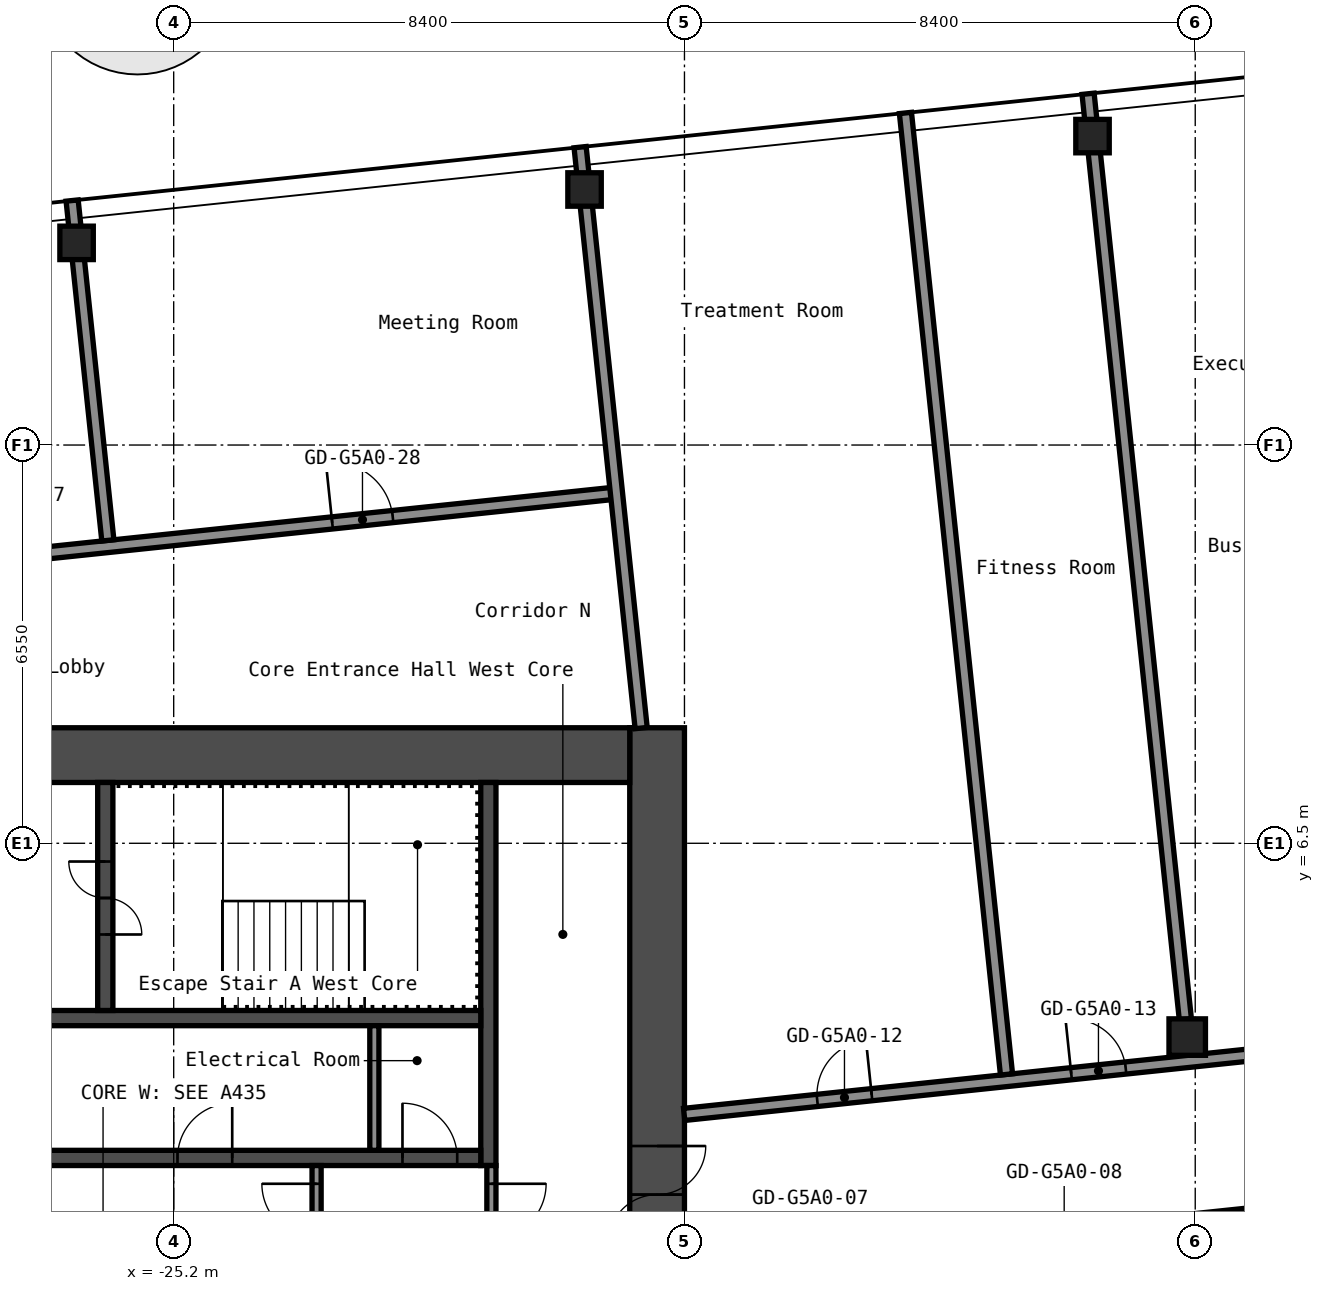
"""IFC4 building model, lengths in metres.
Left out: names, types, materials, properties, quantities, classifications, styles, units other than length and angle.
Written with IfcOpenShell. Run it as: python <this file> out.ifc"""

import sys

from ifc_helpers import new_model, si_unit, direction, frame, frame_2d, origin, origin_2d, place, context, subcontext, project, spatial, rectangle, hollow_rectangle, extrude, element, fill, save


model = new_model("IFC4")
c1 = context("Model", 3, precision=1e-05, world=origin(), true_north=direction((0.0, 1.0)))
c2 = subcontext(c1, "Body", "Model", "MODEL_VIEW")
j1 = project(units=[si_unit("LENGTHUNIT", "METRE"), si_unit("PLANEANGLEUNIT", "RADIAN")], contexts=[c1])
p1 = place(None, origin())
s1 = spatial("IfcSite", under=j1, at=p1, CompositionType="ELEMENT")
p2 = place(p1, origin())
s2 = spatial("IfcBuilding", under=s1, at=p2, CompositionType="ELEMENT")
p3 = place(p2, frame((0.0, 0.0, 239.0)))
s3 = spatial("IfcBuildingStorey", under=s2, at=p3, CompositionType="ELEMENT", Elevation=239.0)
for number, where, z_axis, x_axis in (
    (1, (-26.797, 16.375, 0.0), (0.0, 0.0, 1.0), (1.0, 0.0, 0.0)),
    (2, (-18.443, 17.253, 0.0), (0.0, 0.0, 1.0), (1.0, 0.0, 0.0)),
):
    element("IfcColumn", number, at=place(p3, frame(where, z_axis=z_axis, x_axis=x_axis)), inside=s3, PredefinedType="COLUMN", context=c2, shape_type="SweptSolid", body=[
        extrude(hollow_rectangle(XDim=0.55, YDim=0.55, WallThickness=0.022, InnerFilletRadius=0.033, OuterFilletRadius=0.055, at=origin_2d()), origin(), (0.0, 0.0, 1.0), 2.75),
    ])
p4 = place(p3, frame((-8.532, 3.312, 0.0), z_axis=(0.0, 0.0, 1.0), x_axis=(1.0, 0.0, 0.0)))
e3 = element("IfcColumn", 3, at=p4, inside=s3, PredefinedType="COLUMN", context=c2, shape_type="SweptSolid", body=[
    extrude(hollow_rectangle(XDim=0.6, YDim=0.6, WallThickness=0.025, InnerFilletRadius=0.038, OuterFilletRadius=0.062, at=origin_2d()), origin(), (0.0, 0.0, 1.0), 2.75),
])
p5 = place(p3, frame((-10.089, 18.131, 0.0), z_axis=(0.0, 0.0, 1.0), x_axis=(1.0, 0.0, 0.0)))
e4 = element("IfcColumn", 4, at=p5, inside=s3, PredefinedType="COLUMN", context=c2, shape_type="SweptSolid", body=[
    extrude(hollow_rectangle(XDim=0.55, YDim=0.55, WallThickness=0.022, InnerFilletRadius=0.033, OuterFilletRadius=0.055, at=origin_2d()), origin(), (0.0, 0.0, 1.0), 2.75),
])
p6 = place(p3, frame((-17.25, -8.4, 0.0), z_axis=(0.0, 0.0, 1.0), x_axis=(0.0, 1.0, 0.0)))
e5 = element("IfcWall", 5, at=p6, inside=s3, PredefinedType="SHEAR", context=c2, shape_type="SweptSolid", body=[
    extrude(rectangle(XDim=16.8, YDim=0.9, at=frame_2d((8.4, 0.0))), origin(), (0.0, 0.0, 1.0), 2.75),
])
p7 = place(p6, frame((8.321, 0.0, 0.0)))
e6 = element("IfcOpeningElement", 6, at=p7, cuts=e5, PredefinedType="OPENING", context=c2, shape_type="SweptSolid", body=[
    extrude(rectangle(XDim=1.6, YDim=2.1, at=frame_2d((0.8, 1.05))), frame((0.0, 0.46, 0.0), z_axis=(0.0, -1.0, 0.0), x_axis=(1.0, 0.0, 0.0)), (0.0, 0.0, 1.0), 0.92),
])
p8 = place(p3, frame((-32.7, 7.95, 0.0), z_axis=(0.0, 0.0, 1.0), x_axis=(1.0, 0.0, 0.0)))
e7 = element("IfcWall", 7, at=p8, inside=s3, PredefinedType="SHEAR", context=c2, shape_type="SweptSolid", body=[
    extrude(rectangle(XDim=15.0, YDim=0.9, at=frame_2d((7.5, 0.0))), origin(), (0.0, 0.0, 1.0), 2.75),
])
p9 = place(p8, frame((3.4, 0.0, 0.0)))
e8 = element("IfcOpeningElement", 8, at=p9, cuts=e7, PredefinedType="OPENING", context=c2, shape_type="SweptSolid", body=[
    extrude(rectangle(XDim=1.2, YDim=2.1, at=frame_2d((0.6, 1.05))), frame((0.0, 0.46, 0.0), z_axis=(0.0, -1.0, 0.0), x_axis=(1.0, 0.0, 0.0)), (0.0, 0.0, 1.0), 0.92),
])
p10 = place(p8, frame((0.75, 0.0, 0.0)))
e9 = element("IfcOpeningElement", 9, at=p10, cuts=e7, PredefinedType="OPENING", context=c2, shape_type="SweptSolid", body=[
    extrude(rectangle(XDim=0.9, YDim=2.1, at=frame_2d((0.45, 1.05))), frame((0.0, 0.46, 0.0), z_axis=(0.0, -1.0, 0.0), x_axis=(1.0, 0.0, 0.0)), (0.0, 0.0, 1.0), 0.92),
])
p11 = place(p3, frame((-20.025, 1.2, 0.0), z_axis=(0.0, 0.0, 1.0), x_axis=(0.0, 1.0, 0.0)))
e10 = element("IfcWall", 10, at=p11, inside=s3, PredefinedType="SHEAR", context=c2, shape_type="SweptSolid", body=[
    extrude(rectangle(XDim=6.3, YDim=0.25, at=frame_2d((3.15, 0.0))), origin(), (0.0, 0.0, 1.0), 2.75),
])
p12 = place(p3, frame((-27.65, 1.325, 0.0), z_axis=(0.0, 0.0, 1.0), x_axis=(1.0, 0.0, 0.0)))
e11 = element("IfcWall", 11, at=p12, inside=s3, PredefinedType="SHEAR", context=c2, shape_type="SweptSolid", body=[
    extrude(rectangle(XDim=7.5, YDim=0.25, at=frame_2d((3.75, 0.0))), origin(), (0.0, 0.0, 1.0), 2.75),
])
p13 = place(p12, frame((6.212, 0.0, 0.0)))
e12 = element("IfcOpeningElement", 12, at=p13, cuts=e11, PredefinedType="OPENING", context=c2, shape_type="SweptSolid", body=[
    extrude(rectangle(XDim=0.9, YDim=2.1, at=frame_2d((0.45, 1.05))), frame((0.0, 0.135, 0.0), z_axis=(0.0, -1.0, 0.0), x_axis=(1.0, 0.0, 0.0)), (0.0, 0.0, 1.0), 0.27),
])
p14 = place(p12, frame((2.512, 0.0, 0.0)))
e13 = element("IfcOpeningElement", 13, at=p14, cuts=e11, PredefinedType="OPENING", context=c2, shape_type="SweptSolid", body=[
    extrude(rectangle(XDim=0.9, YDim=2.1, at=frame_2d((0.45, 1.05))), frame((0.0, 0.135, 0.0), z_axis=(0.0, -1.0, 0.0), x_axis=(1.0, 0.0, 0.0)), (0.0, 0.0, 1.0), 0.27),
])
p15 = place(p3, frame((-27.65, 3.625, 0.0), z_axis=(0.0, 0.0, 1.0), x_axis=(1.0, 0.0, 0.0)))
e14 = element("IfcWall", 14, at=p15, inside=s3, PredefinedType="SHEAR", context=c2, shape_type="SweptSolid", body=[
    extrude(rectangle(XDim=7.5, YDim=0.25, at=frame_2d((3.75, 0.0))), origin(), (0.0, 0.0, 1.0), 2.75),
])
p16 = place(p3, frame((-26.325, 3.75, 0.0), z_axis=(0.0, 0.0, 1.0), x_axis=(0.0, 1.0, 0.0)))
e15 = element("IfcWall", 15, at=p16, inside=s3, PredefinedType="SHEAR", context=c2, shape_type="SweptSolid", body=[
    extrude(rectangle(XDim=3.75, YDim=0.25, at=frame_2d((1.875, 0.0))), origin(), (0.0, 0.0, 1.0), 2.75),
])
p17 = place(p16, frame((1.25, 0.0, 0.0)))
e16 = element("IfcOpeningElement", 16, at=p17, cuts=e15, PredefinedType="OPENING", context=c2, shape_type="SweptSolid", body=[
    extrude(rectangle(XDim=1.2, YDim=2.1, at=frame_2d((0.6, 1.05))), frame((0.0, 0.135, 0.0), z_axis=(0.0, -1.0, 0.0), x_axis=(1.0, 0.0, 0.0)), (0.0, 0.0, 1.0), 0.27),
])
p18 = place(p3, frame((-19.975, -1.2, 0.0), z_axis=(0.0, 0.0, 1.0), x_axis=(0.0, 1.0, 0.0)))
e17 = element("IfcWall", 17, at=p18, inside=s3, PredefinedType="PARTITIONING", context=c2, shape_type="SweptSolid", body=[
    extrude(rectangle(XDim=2.4, YDim=0.15, at=frame_2d((1.2, 0.0))), origin(), (0.0, 0.0, 1.0), 2.75),
])
p19 = place(p18, frame((0.3, 0.0, 0.0)))
e18 = element("IfcOpeningElement", 18, at=p19, cuts=e17, PredefinedType="OPENING", context=c2, shape_type="SweptSolid", body=[
    extrude(rectangle(XDim=1.8, YDim=2.1, at=frame_2d((0.9, 1.05))), frame((0.0, 0.085, 0.0), z_axis=(0.0, -1.0, 0.0), x_axis=(1.0, 0.0, 0.0)), (0.0, 0.0, 1.0), 0.17),
])
p20 = place(p3, frame((-22.85, -1.2, 0.0), z_axis=(0.0, 0.0, 1.0), x_axis=(0.0, 1.0, 0.0)))
e19 = element("IfcWall", 19, at=p20, inside=s3, PredefinedType="PARTITIONING", context=c2, shape_type="SweptSolid", body=[
    extrude(rectangle(XDim=2.4, YDim=0.15, at=frame_2d((1.2, 0.0))), origin(), (0.0, 0.0, 1.0), 2.75),
])
p21 = place(p20, frame((0.3, 0.0, 0.0)))
e20 = element("IfcOpeningElement", 20, at=p21, cuts=e19, PredefinedType="OPENING", context=c2, shape_type="SweptSolid", body=[
    extrude(rectangle(XDim=1.8, YDim=2.1, at=frame_2d((0.9, 1.05))), frame((0.0, 0.085, 0.0), z_axis=(0.0, -1.0, 0.0), x_axis=(1.0, 0.0, 0.0)), (0.0, 0.0, 1.0), 0.17),
])
p22 = place(p3, frame((-21.9, 1.45, 0.0), z_axis=(0.0, 0.0, 1.0), x_axis=(0.0, 1.0, 0.0)))
e21 = element("IfcWall", 21, at=p22, inside=s3, PredefinedType="PARTITIONING", context=c2, shape_type="SweptSolid", body=[
    extrude(rectangle(XDim=2.05, YDim=0.15, at=frame_2d((1.025, 0.0))), origin(), (0.0, 0.0, 1.0), 2.75),
])
p23 = place(p3, frame((-16.572, -0.549, 0.0), z_axis=(0.0, 0.0, 1.0), x_axis=(0.994521146831, 0.104535584879, 0.0)))
e22 = element("IfcWall", 22, at=p23, inside=s3, PredefinedType="PARTITIONING", context=c2, shape_type="SweptSolid", body=[
    extrude(rectangle(XDim=33.561, YDim=0.2, at=frame_2d((16.78, 0.0))), origin(), (0.0, 0.0, 1.0), 2.75),
])
p24 = place(p23, frame((1.4, 0.0, 0.0)))
e23 = element("IfcOpeningElement", 23, at=p24, cuts=e22, PredefinedType="OPENING", context=c2, shape_type="SweptSolid", body=[
    extrude(rectangle(XDim=0.9, YDim=2.1, at=frame_2d((0.45, 1.05))), frame((0.0, 0.11, 0.0), z_axis=(0.0, -1.0, 0.0), x_axis=(1.0, 0.0, 0.0)), (0.0, 0.0, 1.0), 0.22),
])
p25 = place(p23, frame((5.6, 0.0, 0.0)))
e24 = element("IfcOpeningElement", 24, at=p25, cuts=e22, PredefinedType="OPENING", context=c2, shape_type="SweptSolid", body=[
    extrude(rectangle(XDim=0.9, YDim=2.1, at=frame_2d((0.45, 1.05))), frame((0.0, 0.11, 0.0), z_axis=(0.0, -1.0, 0.0), x_axis=(1.0, 0.0, 0.0)), (0.0, 0.0, 1.0), 0.22),
])
p26 = place(p23, frame((12.1, 0.0, 0.0)))
e25 = element("IfcOpeningElement", 25, at=p26, cuts=e22, PredefinedType="OPENING", context=c2, shape_type="SweptSolid", body=[
    extrude(rectangle(XDim=1.0, YDim=2.1, at=frame_2d((0.5, 1.05))), frame((0.0, 0.11, 0.0), z_axis=(0.0, -1.0, 0.0), x_axis=(1.0, 0.0, 0.0)), (0.0, 0.0, 1.0), 0.22),
])
p27 = place(p23, frame((18.8, 0.0, 0.0)))
e26 = element("IfcOpeningElement", 26, at=p27, cuts=e22, PredefinedType="OPENING", context=c2, shape_type="SweptSolid", body=[
    extrude(rectangle(XDim=1.0, YDim=2.1, at=frame_2d((0.5, 1.05))), frame((0.0, 0.11, 0.0), z_axis=(0.0, -1.0, 0.0), x_axis=(1.0, 0.0, 0.0)), (0.0, 0.0, 1.0), 0.22),
])
p28 = place(p23, frame((29.4, 0.0, 0.0)))
e27 = element("IfcOpeningElement", 27, at=p28, cuts=e22, PredefinedType="OPENING", context=c2, shape_type="SweptSolid", body=[
    extrude(rectangle(XDim=1.6, YDim=2.1, at=frame_2d((0.8, 1.05))), frame((0.0, 0.11, 0.0), z_axis=(0.0, -1.0, 0.0), x_axis=(1.0, 0.0, 0.0)), (0.0, 0.0, 1.0), 0.22),
])
p29 = place(p3, frame((-16.805, 2.041, 0.0), z_axis=(0.0, 0.0, 1.0), x_axis=(0.994521146831, 0.104535584879, 0.0)))
e28 = element("IfcWall", 28, at=p29, inside=s3, PredefinedType="PARTITIONING", context=c2, shape_type="SweptSolid", body=[
    extrude(rectangle(XDim=33.561, YDim=0.2, at=frame_2d((16.78, 0.0))), origin(), (0.0, 0.0, 1.0), 2.75),
])
p30 = place(p29, frame((2.201, 0.0, 0.0)))
e29 = element("IfcOpeningElement", 29, at=p30, cuts=e28, PredefinedType="OPENING", context=c2, shape_type="SweptSolid", body=[
    extrude(rectangle(XDim=0.9, YDim=2.1, at=frame_2d((0.45, 1.05))), frame((0.0, 0.11, 0.0), z_axis=(0.0, -1.0, 0.0), x_axis=(1.0, 0.0, 0.0)), (0.0, 0.0, 1.0), 0.22),
])
p31 = place(p29, frame((6.401, 0.0, 0.0)))
e30 = element("IfcOpeningElement", 30, at=p31, cuts=e28, PredefinedType="OPENING", context=c2, shape_type="SweptSolid", body=[
    extrude(rectangle(XDim=0.9, YDim=2.1, at=frame_2d((0.45, 1.05))), frame((0.0, 0.11, 0.0), z_axis=(0.0, -1.0, 0.0), x_axis=(1.0, 0.0, 0.0)), (0.0, 0.0, 1.0), 0.22),
])
p32 = place(p29, frame((10.516, 0.0, 0.0)))
e31 = element("IfcOpeningElement", 31, at=p32, cuts=e28, PredefinedType="OPENING", context=c2, shape_type="SweptSolid", body=[
    extrude(rectangle(XDim=0.9, YDim=2.1, at=frame_2d((0.45, 1.05))), frame((0.0, 0.11, 0.0), z_axis=(0.0, -1.0, 0.0), x_axis=(1.0, 0.0, 0.0)), (0.0, 0.0, 1.0), 0.22),
])
p33 = place(p29, frame((14.716, 0.0, 0.0)))
e32 = element("IfcOpeningElement", 32, at=p33, cuts=e28, PredefinedType="OPENING", context=c2, shape_type="SweptSolid", body=[
    extrude(rectangle(XDim=0.9, YDim=2.1, at=frame_2d((0.45, 1.05))), frame((0.0, 0.11, 0.0), z_axis=(0.0, -1.0, 0.0), x_axis=(1.0, 0.0, 0.0)), (0.0, 0.0, 1.0), 0.22),
])
p34 = place(p29, frame((18.241, 0.0, 0.0)))
e33 = element("IfcOpeningElement", 33, at=p34, cuts=e28, PredefinedType="OPENING", context=c2, shape_type="SweptSolid", body=[
    extrude(rectangle(XDim=0.9, YDim=2.1, at=frame_2d((0.45, 1.05))), frame((0.0, 0.11, 0.0), z_axis=(0.0, -1.0, 0.0), x_axis=(1.0, 0.0, 0.0)), (0.0, 0.0, 1.0), 0.22),
])
p35 = place(p29, frame((22.441, 0.0, 0.0)))
e34 = element("IfcOpeningElement", 34, at=p35, cuts=e28, PredefinedType="OPENING", context=c2, shape_type="SweptSolid", body=[
    extrude(rectangle(XDim=0.9, YDim=2.1, at=frame_2d((0.45, 1.05))), frame((0.0, 0.11, 0.0), z_axis=(0.0, -1.0, 0.0), x_axis=(1.0, 0.0, 0.0)), (0.0, 0.0, 1.0), 0.22),
])
p36 = place(p29, frame((26.981, 0.0, 0.0)))
e35 = element("IfcOpeningElement", 35, at=p36, cuts=e28, PredefinedType="OPENING", context=c2, shape_type="SweptSolid", body=[
    extrude(rectangle(XDim=0.9, YDim=2.1, at=frame_2d((0.45, 1.05))), frame((0.0, 0.11, 0.0), z_axis=(0.0, -1.0, 0.0), x_axis=(1.0, 0.0, 0.0)), (0.0, 0.0, 1.0), 0.22),
])
p37 = place(p29, frame((31.181, 0.0, 0.0)))
e36 = element("IfcOpeningElement", 36, at=p37, cuts=e28, PredefinedType="OPENING", context=c2, shape_type="SweptSolid", body=[
    extrude(rectangle(XDim=0.9, YDim=2.1, at=frame_2d((0.45, 1.05))), frame((0.0, 0.11, 0.0), z_axis=(0.0, -1.0, 0.0), x_axis=(1.0, 0.0, 0.0)), (0.0, 0.0, 1.0), 0.22),
])
p38 = place(p3, frame((-39.102, 10.034, 0.0), z_axis=(0.0, 0.0, 1.0), x_axis=(0.994522585465, 0.104521897229, 0.0)))
e37 = element("IfcWall", 37, at=p38, inside=s3, PredefinedType="PARTITIONING", context=c2, shape_type="SweptSolid", body=[
    extrude(rectangle(XDim=21.3, YDim=0.2, at=frame_2d((10.65, 0.0))), origin(), (0.0, 0.0, 1.0), 2.75),
])
p39 = place(p38, frame((3.05, 0.0, 0.0)))
e38 = element("IfcOpeningElement", 38, at=p39, cuts=e37, PredefinedType="OPENING", context=c2, shape_type="SweptSolid", body=[
    extrude(rectangle(XDim=1.0, YDim=2.1, at=frame_2d((0.5, 1.05))), frame((0.0, 0.11, 0.0), z_axis=(0.0, -1.0, 0.0), x_axis=(1.0, 0.0, 0.0)), (0.0, 0.0, 1.0), 0.22),
])
p40 = place(p38, frame((6.57, 0.0, 0.0)))
e39 = element("IfcOpeningElement", 39, at=p40, cuts=e37, PredefinedType="OPENING", context=c2, shape_type="SweptSolid", body=[
    extrude(rectangle(XDim=0.9, YDim=2.1, at=frame_2d((0.45, 1.05))), frame((0.0, 0.11, 0.0), z_axis=(0.0, -1.0, 0.0), x_axis=(1.0, 0.0, 0.0)), (0.0, 0.0, 1.0), 0.22),
])
p41 = place(p38, frame((10.77, 0.0, 0.0)))
e40 = element("IfcOpeningElement", 40, at=p41, cuts=e37, PredefinedType="OPENING", context=c2, shape_type="SweptSolid", body=[
    extrude(rectangle(XDim=0.9, YDim=2.1, at=frame_2d((0.45, 1.05))), frame((0.0, 0.11, 0.0), z_axis=(0.0, -1.0, 0.0), x_axis=(1.0, 0.0, 0.0)), (0.0, 0.0, 1.0), 0.22),
])
p42 = place(p38, frame((16.6, 0.0, 0.0)))
e41 = element("IfcOpeningElement", 41, at=p42, cuts=e37, PredefinedType="OPENING", context=c2, shape_type="SweptSolid", body=[
    extrude(rectangle(XDim=1.0, YDim=2.1, at=frame_2d((0.5, 1.05))), frame((0.0, 0.11, 0.0), z_axis=(0.0, -1.0, 0.0), x_axis=(1.0, 0.0, 0.0)), (0.0, 0.0, 1.0), 0.22),
])
p43 = place(p3, frame((-26.283, 11.482, 0.0), z_axis=(0.0, 0.0, 1.0), x_axis=(-0.104560413987, 0.994518536693, 0.0)))
e42 = element("IfcWall", 42, at=p43, inside=s3, PredefinedType="PARTITIONING", context=c2, shape_type="SweptSolid", body=[
    extrude(rectangle(XDim=5.62, YDim=0.2, at=frame_2d((2.81, 0.0))), origin(), (0.0, 0.0, 1.0), 2.75),
])
p44 = place(p3, frame((-17.512, 8.395, 0.0), z_axis=(0.0, 0.0, 1.0), x_axis=(-0.104524714473, 0.994522289375, 0.0)))
e43 = element("IfcWall", 43, at=p44, inside=s3, PredefinedType="PARTITIONING", context=c2, shape_type="SweptSolid", body=[
    extrude(rectangle(XDim=9.607, YDim=0.2, at=frame_2d((4.803, 0.0))), origin(), (0.0, 0.0, 1.0), 2.75),
])
p45 = place(p3, frame((-11.504, 2.699, 0.0), z_axis=(0.0, 0.0, 1.0), x_axis=(-0.104536114326, 0.99452109118, 0.0)))
e44 = element("IfcWall", 44, at=p45, inside=s3, PredefinedType="PARTITIONING", context=c2, shape_type="SweptSolid", body=[
    extrude(rectangle(XDim=15.9, YDim=0.2, at=frame_2d((7.95, 0.0))), origin(), (0.0, 0.0, 1.0), 2.75),
])
p46 = place(p3, frame((-8.562, 3.603, 0.0), z_axis=(0.0, 0.0, 1.0), x_axis=(-0.104523729364, 0.99452239291, 0.0)))
e45 = element("IfcWall", 45, at=p46, inside=s3, PredefinedType="PARTITIONING", context=c2, shape_type="SweptSolid", body=[
    extrude(rectangle(XDim=15.308, YDim=0.2, at=frame_2d((7.654, 0.0))), origin(), (0.0, 0.0, 1.0), 2.75),
])
p47 = place(p7, origin())
e46 = element("IfcDoor", 46, at=p47, inside=s3, OperationType="DOUBLE_DOOR_SINGLE_SWING", PredefinedType="DOOR", context=c2, shape_type="SweptSolid", body=[
    extrude(rectangle(XDim=1.6, YDim=2.1, at=frame_2d((0.8, 1.05))), frame((0.0, 0.025, 0.0), z_axis=(0.0, -1.0, 0.0), x_axis=(1.0, 0.0, 0.0)), (0.0, 0.0, 1.0), 0.05),
])
fill(e6, e46)
p48 = place(p17, origin())
e47 = element("IfcDoor", 47, at=p48, inside=s3, OperationType="DOUBLE_DOOR_SINGLE_SWING", PredefinedType="DOOR", context=c2, shape_type="SweptSolid", body=[
    extrude(rectangle(XDim=1.2, YDim=2.1, at=frame_2d((0.6, 1.05))), frame((0.0, 0.025, 0.0), z_axis=(0.0, -1.0, 0.0), x_axis=(1.0, 0.0, 0.0)), (0.0, 0.0, 1.0), 0.05),
])
fill(e16, e47)
p49 = place(p19, origin())
e48 = element("IfcDoor", 48, at=p49, inside=s3, OperationType="DOUBLE_DOOR_SINGLE_SWING", PredefinedType="DOOR", context=c2, shape_type="SweptSolid", body=[
    extrude(rectangle(XDim=1.8, YDim=2.1, at=frame_2d((0.9, 1.05))), frame((0.0, 0.025, 0.0), z_axis=(0.0, -1.0, 0.0), x_axis=(1.0, 0.0, 0.0)), (0.0, 0.0, 1.0), 0.05),
])
fill(e18, e48)
p50 = place(p21, origin())
e49 = element("IfcDoor", 49, at=p50, inside=s3, OperationType="DOUBLE_DOOR_SINGLE_SWING", PredefinedType="DOOR", context=c2, shape_type="SweptSolid", body=[
    extrude(rectangle(XDim=1.8, YDim=2.1, at=frame_2d((0.9, 1.05))), frame((0.0, 0.025, 0.0), z_axis=(0.0, -1.0, 0.0), x_axis=(1.0, 0.0, 0.0)), (0.0, 0.0, 1.0), 0.05),
])
fill(e20, e49)
p51 = place(p13, origin())
e50 = element("IfcDoor", 50, at=p51, inside=s3, OperationType="SINGLE_SWING_RIGHT", PredefinedType="DOOR", context=c2, shape_type="SweptSolid", body=[
    extrude(rectangle(XDim=0.9, YDim=2.1, at=frame_2d((0.45, 1.05))), frame((0.0, 0.025, 0.0), z_axis=(0.0, -1.0, 0.0), x_axis=(1.0, 0.0, 0.0)), (0.0, 0.0, 1.0), 0.05),
])
fill(e12, e50)
p52 = place(p14, origin())
e51 = element("IfcDoor", 51, at=p52, inside=s3, OperationType="SINGLE_SWING_LEFT", PredefinedType="DOOR", context=c2, shape_type="SweptSolid", body=[
    extrude(rectangle(XDim=0.9, YDim=2.1, at=frame_2d((0.45, 1.05))), frame((0.0, 0.025, 0.0), z_axis=(0.0, -1.0, 0.0), x_axis=(1.0, 0.0, 0.0)), (0.0, 0.0, 1.0), 0.05),
])
fill(e13, e51)
p53 = place(p30, origin())
e52 = element("IfcDoor", 52, at=p53, inside=s3, OperationType="SINGLE_SWING_LEFT", PredefinedType="DOOR", context=c2, shape_type="SweptSolid", body=[
    extrude(rectangle(XDim=0.9, YDim=2.1, at=frame_2d((0.45, 1.05))), frame((0.0, 0.025, 0.0), z_axis=(0.0, -1.0, 0.0), x_axis=(1.0, 0.0, 0.0)), (0.0, 0.0, 1.0), 0.05),
])
fill(e29, e52)
p54 = place(p31, origin())
e53 = element("IfcDoor", 53, at=p54, inside=s3, OperationType="SINGLE_SWING_RIGHT", PredefinedType="DOOR", context=c2, shape_type="SweptSolid", body=[
    extrude(rectangle(XDim=0.9, YDim=2.1, at=frame_2d((0.45, 1.05))), frame((0.0, 0.025, 0.0), z_axis=(0.0, -1.0, 0.0), x_axis=(1.0, 0.0, 0.0)), (0.0, 0.0, 1.0), 0.05),
])
fill(e30, e53)
p55 = place(p42, origin())
e54 = element("IfcDoor", 54, at=p55, inside=s3, OperationType="SINGLE_SWING_RIGHT", PredefinedType="DOOR", context=c2, shape_type="SweptSolid", body=[
    extrude(rectangle(XDim=1.0, YDim=2.1, at=frame_2d((0.5, 1.05))), frame((0.0, 0.025, 0.0), z_axis=(0.0, -1.0, 0.0), x_axis=(1.0, 0.0, 0.0)), (0.0, 0.0, 1.0), 0.05),
])
fill(e41, e54)
save(model, sys.argv[1])
